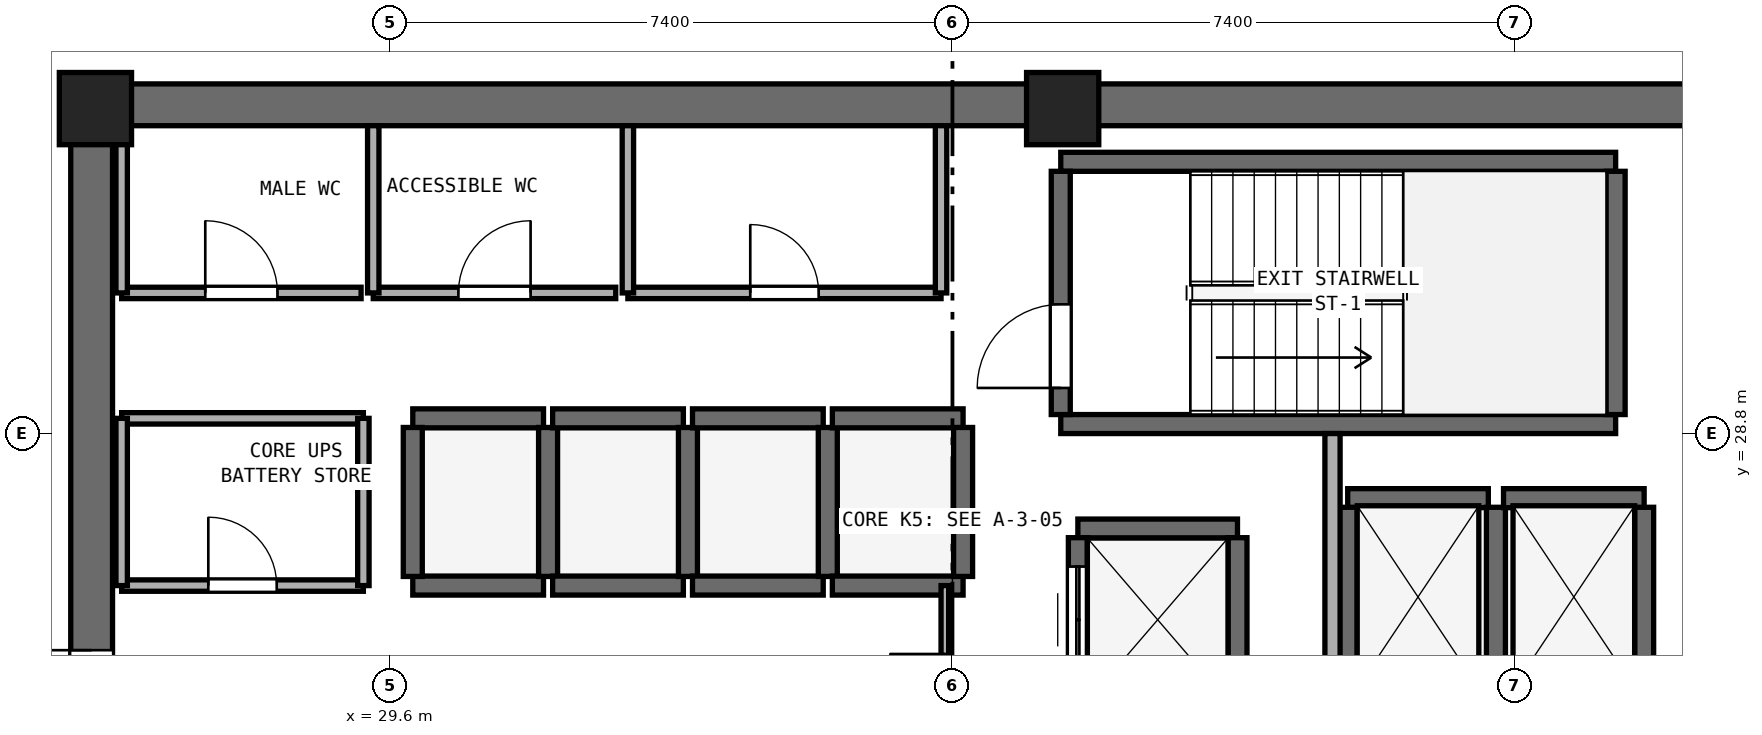
"""IFC4 building model, lengths in metres.
Left out: names, types, materials, properties, quantities, classifications, styles, units other than length and angle.
Written with IfcOpenShell. Run it as: python <this file> out.ifc"""

import sys

from ifc_helpers import new_model, si_unit, direction, frame, frame_2d, origin, origin_2d, place, context, subcontext, project, spatial, rectangle, extrude, element, fill, save


model = new_model("IFC4")
c1 = context("Model", 3, precision=1e-05, world=origin(), true_north=direction((0.0, 1.0)))
c2 = subcontext(c1, "Body", "Model", "MODEL_VIEW")
j1 = project(units=[si_unit("LENGTHUNIT", "METRE"), si_unit("PLANEANGLEUNIT", "RADIAN")], contexts=[c1])
p1 = place(None, origin())
s1 = spatial("IfcSite", under=j1, at=p1, CompositionType="ELEMENT")
p2 = place(p1, origin())
s2 = spatial("IfcBuilding", under=s1, at=p2, CompositionType="ELEMENT")
p3 = place(p2, frame((0.0, 0.0, 147.8)))
s3 = spatial("IfcBuildingStorey", under=s2, at=p3, CompositionType="ELEMENT", Elevation=147.8)
p4 = place(p3, frame((25.4, 33.125, 0.0), z_axis=(0.0, 0.0, 1.0), x_axis=(1.0, 0.0, 0.0)))
e1 = element("IfcWall", 1, at=p4, inside=s3, PredefinedType="SHEAR", context=c2, shape_type="SweptSolid", body=[
    extrude(rectangle(XDim=23.2, YDim=0.55, at=frame_2d((11.6, 0.0))), origin(), (0.0, 0.0, 1.0), 3.54),
])
p5 = place(p3, frame((25.675, 17.55, 0.0), z_axis=(0.0, 0.0, 1.0), x_axis=(0.0, 1.0, 0.0)))
e2 = element("IfcWall", 2, at=p5, inside=s3, PredefinedType="SHEAR", context=c2, shape_type="SweptSolid", body=[
    extrude(rectangle(XDim=15.3, YDim=0.55, at=frame_2d((7.65, 0.0))), origin(), (0.0, 0.0, 1.0), 3.54),
])
p6 = place(p5, frame((6.9, 0.0, 0.0)))
e3 = element("IfcOpeningElement", 3, at=p6, cuts=e2, PredefinedType="OPENING", context=c2, shape_type="SweptSolid", body=[
    extrude(rectangle(XDim=1.5, YDim=2.15, at=frame_2d((0.75, 1.075))), frame((0.0, 0.285, 0.0), z_axis=(0.0, -1.0, 0.0), x_axis=(1.0, 0.0, 0.0)), (0.0, 0.0, 1.0), 0.57),
])
for number, where, z_axis, x_axis in (
    (4, (38.45, 33.075, 0.0), (0.0, 0.0, 1.0), (1.0, 0.0, 0.0)),
    (5, (25.725, 33.075, 0.0), (0.0, 0.0, 1.0), (1.0, 0.0, 0.0)),
):
    element("IfcColumn", number, at=place(p3, frame(where, z_axis=z_axis, x_axis=x_axis)), inside=s3, PredefinedType="PILASTER", context=c2, shape_type="SweptSolid", body=[
        extrude(rectangle(XDim=0.95, YDim=0.95, at=origin_2d()), origin(), (0.0, 0.0, 1.0), 3.8),
    ])
for number, where, z_axis, x_axis in (
    (6, (38.425, 28.925, 0.0), (0.0, 0.0, 1.0), (1.0, 0.0, 0.0)),
    (7, (38.425, 32.375, 0.0), (0.0, 0.0, 1.0), (1.0, 0.0, 0.0)),
):
    element("IfcWall", number, at=place(p3, frame(where, z_axis=z_axis, x_axis=x_axis)), inside=s3, PredefinedType="SHEAR", context=c2, shape_type="SweptSolid", body=[
        extrude(rectangle(XDim=7.3, YDim=0.25, at=frame_2d((3.65, 0.0))), origin(), (0.0, 0.0, 1.0), 3.54),
    ])
p7 = place(p3, frame((38.425, 29.05, 0.0), z_axis=(0.0, 0.0, 1.0), x_axis=(0.0, 1.0, 0.0)))
e8 = element("IfcWall", 8, at=p7, inside=s3, PredefinedType="SHEAR", context=c2, shape_type="SweptSolid", body=[
    extrude(rectangle(XDim=3.2, YDim=0.25, at=frame_2d((1.6, 0.0))), origin(), (0.0, 0.0, 1.0), 3.54),
])
p8 = place(p7, frame((0.35, 0.0, 0.0)))
e9 = element("IfcOpeningElement", 9, at=p8, cuts=e8, PredefinedType="OPENING", context=c2, shape_type="SweptSolid", body=[
    extrude(rectangle(XDim=1.1, YDim=2.15, at=frame_2d((0.55, 1.075))), frame((0.0, 0.135, 0.0), z_axis=(0.0, -1.0, 0.0), x_axis=(1.0, 0.0, 0.0)), (0.0, 0.0, 1.0), 0.27),
])
p9 = place(p3, frame((45.725, 29.05, 0.0), z_axis=(0.0, 0.0, 1.0), x_axis=(0.0, 1.0, 0.0)))
e10 = element("IfcWall", 10, at=p9, inside=s3, PredefinedType="SHEAR", context=c2, shape_type="SweptSolid", body=[
    extrude(rectangle(XDim=3.2, YDim=0.25, at=frame_2d((1.6, 0.0))), origin(), (0.0, 0.0, 1.0), 3.54),
])
for number, where, z_axis, x_axis in (
    (11, (29.9, 26.8, 0.0), (0.0, 0.0, 1.0), (1.0, 0.0, 0.0)),
    (12, (29.9, 29.0, 0.0), (0.0, 0.0, 1.0), (1.0, 0.0, 0.0)),
):
    element("IfcWall", number, at=place(p3, frame(where, z_axis=z_axis, x_axis=x_axis)), inside=s3, PredefinedType="SHEAR", context=c2, shape_type="SweptSolid", body=[
        extrude(rectangle(XDim=1.72, YDim=0.25, at=frame_2d((0.86, 0.0))), origin(), (0.0, 0.0, 1.0), 3.54),
    ])
for number, where, z_axis, x_axis in (
    (13, (29.9, 26.92, 0.0), (0.0, 0.0, 1.0), (0.0, 1.0, 0.0)),
    (14, (31.68, 26.92, 0.0), (0.0, 0.0, 1.0), (0.0, 1.0, 0.0)),
):
    element("IfcWall", number, at=place(p3, frame(where, z_axis=z_axis, x_axis=x_axis)), inside=s3, PredefinedType="SHEAR", context=c2, shape_type="SweptSolid", body=[
        extrude(rectangle(XDim=1.96, YDim=0.25, at=frame_2d((0.98, 0.0))), origin(), (0.0, 0.0, 1.0), 3.54),
    ])
for number, where, z_axis, x_axis in (
    (15, (31.74, 26.8, 0.0), (0.0, 0.0, 1.0), (1.0, 0.0, 0.0)),
    (16, (31.74, 29.0, 0.0), (0.0, 0.0, 1.0), (1.0, 0.0, 0.0)),
):
    element("IfcWall", number, at=place(p3, frame(where, z_axis=z_axis, x_axis=x_axis)), inside=s3, PredefinedType="SHEAR", context=c2, shape_type="SweptSolid", body=[
        extrude(rectangle(XDim=1.72, YDim=0.25, at=frame_2d((0.86, 0.0))), origin(), (0.0, 0.0, 1.0), 3.54),
    ])
p10 = place(p3, frame((33.52, 26.92, 0.0), z_axis=(0.0, 0.0, 1.0), x_axis=(0.0, 1.0, 0.0)))
e17 = element("IfcWall", 17, at=p10, inside=s3, PredefinedType="SHEAR", context=c2, shape_type="SweptSolid", body=[
    extrude(rectangle(XDim=1.96, YDim=0.25, at=frame_2d((0.98, 0.0))), origin(), (0.0, 0.0, 1.0), 3.54),
])
for number, where, z_axis, x_axis in (
    (18, (33.58, 26.8, 0.0), (0.0, 0.0, 1.0), (1.0, 0.0, 0.0)),
    (19, (33.58, 29.0, 0.0), (0.0, 0.0, 1.0), (1.0, 0.0, 0.0)),
):
    element("IfcWall", number, at=place(p3, frame(where, z_axis=z_axis, x_axis=x_axis)), inside=s3, PredefinedType="SHEAR", context=c2, shape_type="SweptSolid", body=[
        extrude(rectangle(XDim=1.72, YDim=0.25, at=frame_2d((0.86, 0.0))), origin(), (0.0, 0.0, 1.0), 3.54),
    ])
p11 = place(p3, frame((35.36, 26.92, 0.0), z_axis=(0.0, 0.0, 1.0), x_axis=(0.0, 1.0, 0.0)))
e20 = element("IfcWall", 20, at=p11, inside=s3, PredefinedType="SHEAR", context=c2, shape_type="SweptSolid", body=[
    extrude(rectangle(XDim=1.96, YDim=0.25, at=frame_2d((0.98, 0.0))), origin(), (0.0, 0.0, 1.0), 3.54),
])
for number, where, z_axis, x_axis in (
    (21, (35.42, 26.8, 0.0), (0.0, 0.0, 1.0), (1.0, 0.0, 0.0)),
    (22, (35.42, 29.0, 0.0), (0.0, 0.0, 1.0), (1.0, 0.0, 0.0)),
):
    element("IfcWall", number, at=place(p3, frame(where, z_axis=z_axis, x_axis=x_axis)), inside=s3, PredefinedType="SHEAR", context=c2, shape_type="SweptSolid", body=[
        extrude(rectangle(XDim=1.72, YDim=0.25, at=frame_2d((0.86, 0.0))), origin(), (0.0, 0.0, 1.0), 3.54),
    ])
p12 = place(p3, frame((37.14, 26.92, 0.0), z_axis=(0.0, 0.0, 1.0), x_axis=(0.0, 1.0, 0.0)))
e23 = element("IfcWall", 23, at=p12, inside=s3, PredefinedType="SHEAR", context=c2, shape_type="SweptSolid", body=[
    extrude(rectangle(XDim=1.96, YDim=0.25, at=frame_2d((0.98, 0.0))), origin(), (0.0, 0.0, 1.0), 3.54),
])
p13 = place(p3, frame((42.2, 27.95, 0.0), z_axis=(0.0, 0.0, 1.0), x_axis=(1.0, 0.0, 0.0)))
e24 = element("IfcWall", 24, at=p13, inside=s3, PredefinedType="SHEAR", context=c2, shape_type="SweptSolid", body=[
    extrude(rectangle(XDim=1.85, YDim=0.25, at=frame_2d((0.925, 0.0))), origin(), (0.0, 0.0, 1.0), 3.54),
])
for number, where, z_axis, x_axis in (
    (25, (42.2, 25.47, 0.0), (0.0, 0.0, 1.0), (0.0, 1.0, 0.0)),
    (26, (44.15, 25.47, 0.0), (0.0, 0.0, 1.0), (0.0, 1.0, 0.0)),
):
    element("IfcWall", number, at=place(p3, frame(where, z_axis=z_axis, x_axis=x_axis)), inside=s3, PredefinedType="SHEAR", context=c2, shape_type="SweptSolid", body=[
        extrude(rectangle(XDim=2.36, YDim=0.25, at=frame_2d((1.18, 0.0))), origin(), (0.0, 0.0, 1.0), 3.54),
    ])
p14 = place(p3, frame((44.25, 27.95, 0.0), z_axis=(0.0, 0.0, 1.0), x_axis=(1.0, 0.0, 0.0)))
e27 = element("IfcWall", 27, at=p14, inside=s3, PredefinedType="SHEAR", context=c2, shape_type="SweptSolid", body=[
    extrude(rectangle(XDim=1.85, YDim=0.25, at=frame_2d((0.925, 0.0))), origin(), (0.0, 0.0, 1.0), 3.54),
])
p15 = place(p3, frame((46.1, 25.47, 0.0), z_axis=(0.0, 0.0, 1.0), x_axis=(0.0, 1.0, 0.0)))
e28 = element("IfcWall", 28, at=p15, inside=s3, PredefinedType="SHEAR", context=c2, shape_type="SweptSolid", body=[
    extrude(rectangle(XDim=2.36, YDim=0.25, at=frame_2d((1.18, 0.0))), origin(), (0.0, 0.0, 1.0), 3.54),
])
p16 = place(p3, frame((38.65, 27.55, 0.0), z_axis=(0.0, 0.0, 1.0), x_axis=(1.0, 0.0, 0.0)))
e29 = element("IfcWall", 29, at=p16, inside=s3, PredefinedType="SHEAR", context=c2, shape_type="SweptSolid", body=[
    extrude(rectangle(XDim=2.1, YDim=0.25, at=frame_2d((1.05, 0.0))), origin(), (0.0, 0.0, 1.0), 3.54),
])
p17 = place(p3, frame((38.65, 25.27, 0.0), z_axis=(0.0, 0.0, 1.0), x_axis=(0.0, 1.0, 0.0)))
e30 = element("IfcWall", 30, at=p17, inside=s3, PredefinedType="SHEAR", context=c2, shape_type="SweptSolid", body=[
    extrude(rectangle(XDim=2.16, YDim=0.25, at=frame_2d((1.08, 0.0))), origin(), (0.0, 0.0, 1.0), 3.54),
])
p18 = place(p17, frame((0.38, 0.0, 0.0)))
e31 = element("IfcOpeningElement", 31, at=p18, cuts=e30, PredefinedType="OPENING", context=c2, shape_type="SweptSolid", body=[
    extrude(rectangle(XDim=1.4, YDim=2.2, at=frame_2d((0.7, 1.1))), frame((0.0, 0.135, 0.0), z_axis=(0.0, -1.0, 0.0), x_axis=(1.0, 0.0, 0.0)), (0.0, 0.0, 1.0), 0.27),
])
p19 = place(p3, frame((40.75, 25.27, 0.0), z_axis=(0.0, 0.0, 1.0), x_axis=(0.0, 1.0, 0.0)))
e32 = element("IfcWall", 32, at=p19, inside=s3, PredefinedType="SHEAR", context=c2, shape_type="SweptSolid", body=[
    extrude(rectangle(XDim=2.16, YDim=0.25, at=frame_2d((1.08, 0.0))), origin(), (0.0, 0.0, 1.0), 3.54),
])
p20 = place(p3, frame((42.0, 22.75, 0.0), z_axis=(0.0, 0.0, 1.0), x_axis=(0.0, 1.0, 0.0)))
e33 = element("IfcWall", 33, at=p20, inside=s3, PredefinedType="SOLIDWALL", context=c2, shape_type="SweptSolid", body=[
    extrude(rectangle(XDim=6.05, YDim=0.2, at=frame_2d((3.025, 0.0))), origin(), (0.0, 0.0, 1.0), 3.54),
])
p21 = place(p20, frame((0.65, 0.0, 0.0)))
e34 = element("IfcOpeningElement", 34, at=p21, cuts=e33, PredefinedType="OPENING", context=c2, shape_type="SweptSolid", body=[
    extrude(rectangle(XDim=1.2, YDim=2.15, at=frame_2d((0.6, 1.075))), frame((0.0, 0.11, 0.0), z_axis=(0.0, -1.0, 0.0), x_axis=(1.0, 0.0, 0.0)), (0.0, 0.0, 1.0), 0.22),
])
p22 = place(p3, frame((26.07, 30.65, 0.0), z_axis=(0.0, 0.0, 1.0), x_axis=(1.0, 0.0, 0.0)))
e35 = element("IfcWall", 35, at=p22, inside=s3, PredefinedType="PARTITIONING", context=c2, shape_type="SweptSolid", body=[
    extrude(rectangle(XDim=3.15, YDim=0.15, at=frame_2d((1.575, 0.0))), origin(), (0.0, 0.0, 1.0), 3.54),
])
p23 = place(p22, frame((1.1, 0.0, 0.0)))
e36 = element("IfcOpeningElement", 36, at=p23, cuts=e35, PredefinedType="OPENING", context=c2, shape_type="SweptSolid", body=[
    extrude(rectangle(XDim=0.95, YDim=2.1, at=frame_2d((0.475, 1.05))), frame((0.0, 0.085, 0.0), z_axis=(0.0, -1.0, 0.0), x_axis=(1.0, 0.0, 0.0)), (0.0, 0.0, 1.0), 0.17),
])
p24 = place(p3, frame((26.07, 30.65, 0.0), z_axis=(0.0, 0.0, 1.0), x_axis=(0.0, 1.0, 0.0)))
e37 = element("IfcWall", 37, at=p24, inside=s3, PredefinedType="PARTITIONING", context=c2, shape_type="SweptSolid", body=[
    extrude(rectangle(XDim=2.2, YDim=0.15, at=frame_2d((1.1, 0.0))), origin(), (0.0, 0.0, 1.0), 2.64),
])
p25 = place(p3, frame((29.38, 30.65, 0.0), z_axis=(0.0, 0.0, 1.0), x_axis=(1.0, 0.0, 0.0)))
e38 = element("IfcWall", 38, at=p25, inside=s3, PredefinedType="PARTITIONING", context=c2, shape_type="SweptSolid", body=[
    extrude(rectangle(XDim=3.19, YDim=0.15, at=frame_2d((1.595, 0.0))), origin(), (0.0, 0.0, 1.0), 3.54),
])
p26 = place(p25, frame((1.12, 0.0, 0.0)))
e39 = element("IfcOpeningElement", 39, at=p26, cuts=e38, PredefinedType="OPENING", context=c2, shape_type="SweptSolid", body=[
    extrude(rectangle(XDim=0.95, YDim=2.1, at=frame_2d((0.475, 1.05))), frame((0.0, 0.085, 0.0), z_axis=(0.0, -1.0, 0.0), x_axis=(1.0, 0.0, 0.0)), (0.0, 0.0, 1.0), 0.17),
])
p27 = place(p3, frame((29.38, 30.65, 0.0), z_axis=(0.0, 0.0, 1.0), x_axis=(0.0, 1.0, 0.0)))
e40 = element("IfcWall", 40, at=p27, inside=s3, PredefinedType="PARTITIONING", context=c2, shape_type="SweptSolid", body=[
    extrude(rectangle(XDim=2.2, YDim=0.15, at=frame_2d((1.1, 0.0))), origin(), (0.0, 0.0, 1.0), 3.54),
])
p28 = place(p3, frame((32.73, 30.65, 0.0), z_axis=(0.0, 0.0, 1.0), x_axis=(1.0, 0.0, 0.0)))
e41 = element("IfcWall", 41, at=p28, inside=s3, PredefinedType="PARTITIONING", context=c2, shape_type="SweptSolid", body=[
    extrude(rectangle(XDim=4.12, YDim=0.15, at=frame_2d((2.06, 0.0))), origin(), (0.0, 0.0, 1.0), 3.54),
])
p29 = place(p28, frame((1.61, 0.0, 0.0)))
e42 = element("IfcOpeningElement", 42, at=p29, cuts=e41, PredefinedType="OPENING", context=c2, shape_type="SweptSolid", body=[
    extrude(rectangle(XDim=0.9, YDim=2.1, at=frame_2d((0.45, 1.05))), frame((0.0, 0.085, 0.0), z_axis=(0.0, -1.0, 0.0), x_axis=(1.0, 0.0, 0.0)), (0.0, 0.0, 1.0), 0.17),
])
for number, where, z_axis, x_axis in (
    (43, (32.73, 30.65, 0.0), (0.0, 0.0, 1.0), (0.0, 1.0, 0.0)),
    (44, (36.85, 30.65, 0.0), (0.0, 0.0, 1.0), (0.0, 1.0, 0.0)),
):
    element("IfcWall", number, at=place(p3, frame(where, z_axis=z_axis, x_axis=x_axis)), inside=s3, PredefinedType="PARTITIONING", context=c2, shape_type="SweptSolid", body=[
        extrude(rectangle(XDim=2.2, YDim=0.15, at=frame_2d((1.1, 0.0))), origin(), (0.0, 0.0, 1.0), 3.54),
    ])
p30 = place(p3, frame((26.07, 26.8, 0.0), z_axis=(0.0, 0.0, 1.0), x_axis=(1.0, 0.0, 0.0)))
e45 = element("IfcWall", 45, at=p30, inside=s3, PredefinedType="PARTITIONING", context=c2, shape_type="SweptSolid", body=[
    extrude(rectangle(XDim=3.18, YDim=0.15, at=frame_2d((1.59, 0.0))), origin(), (0.0, 0.0, 1.0), 3.54),
])
p31 = place(p30, frame((1.14, 0.0, 0.0)))
e46 = element("IfcOpeningElement", 46, at=p31, cuts=e45, PredefinedType="OPENING", context=c2, shape_type="SweptSolid", body=[
    extrude(rectangle(XDim=0.9, YDim=2.1, at=frame_2d((0.45, 1.05))), frame((0.0, 0.085, 0.0), z_axis=(0.0, -1.0, 0.0), x_axis=(1.0, 0.0, 0.0)), (0.0, 0.0, 1.0), 0.17),
])
p32 = place(p3, frame((26.07, 29.0, 0.0), z_axis=(0.0, 0.0, 1.0), x_axis=(1.0, 0.0, 0.0)))
e47 = element("IfcWall", 47, at=p32, inside=s3, PredefinedType="PARTITIONING", context=c2, shape_type="SweptSolid", body=[
    extrude(rectangle(XDim=3.18, YDim=0.15, at=frame_2d((1.59, 0.0))), origin(), (0.0, 0.0, 1.0), 3.54),
])
p33 = place(p3, frame((26.07, 26.8, 0.0), z_axis=(0.0, 0.0, 1.0), x_axis=(0.0, 1.0, 0.0)))
e48 = element("IfcWall", 48, at=p33, inside=s3, PredefinedType="PARTITIONING", context=c2, shape_type="SweptSolid", body=[
    extrude(rectangle(XDim=2.2, YDim=0.15, at=frame_2d((1.1, 0.0))), origin(), (0.0, 0.0, 1.0), 2.64),
])
p34 = place(p3, frame((29.25, 26.8, 0.0), z_axis=(0.0, 0.0, 1.0), x_axis=(0.0, 1.0, 0.0)))
e49 = element("IfcWall", 49, at=p34, inside=s3, PredefinedType="PARTITIONING", context=c2, shape_type="SweptSolid", body=[
    extrude(rectangle(XDim=2.2, YDim=0.15, at=frame_2d((1.1, 0.0))), origin(), (0.0, 0.0, 1.0), 3.54),
])
p35 = place(p3, frame((36.9, 23.6, 0.0), z_axis=(0.0, 0.0, 1.0), x_axis=(0.0, 1.0, 0.0)))
e50 = element("IfcWall", 50, at=p35, inside=s3, PredefinedType="PARTITIONING", context=c2, shape_type="SweptSolid", body=[
    extrude(rectangle(XDim=3.2, YDim=0.1, at=frame_2d((1.6, 0.0))), origin(), (0.0, 0.0, 1.0), 3.54),
])
p36 = place(p35, frame((0.85, 0.0, 0.0)))
e51 = element("IfcOpeningElement", 51, at=p36, cuts=e50, PredefinedType="OPENING", context=c2, shape_type="SweptSolid", body=[
    extrude(rectangle(XDim=1.45, YDim=2.12, at=frame_2d((0.725, 1.06))), frame((0.0, 0.06, 0.0), z_axis=(0.0, -1.0, 0.0), x_axis=(1.0, 0.0, 0.0)), (0.0, 0.0, 1.0), 0.12),
])
p37 = place(p8, origin())
e52 = element("IfcDoor", 52, at=p37, inside=s3, OperationType="SINGLE_SWING_LEFT", PredefinedType="DOOR", context=c2, shape_type="SweptSolid", body=[
    extrude(rectangle(XDim=1.1, YDim=2.15, at=frame_2d((0.55, 1.075))), frame((0.0, 0.025, 0.0), z_axis=(0.0, -1.0, 0.0), x_axis=(1.0, 0.0, 0.0)), (0.0, 0.0, 1.0), 0.05),
])
fill(e9, e52)
p38 = place(p18, origin())
e53 = element("IfcDoor", 53, at=p38, inside=s3, OperationType="DOUBLE_DOOR_SLIDING", PredefinedType="DOOR", context=c2, shape_type="SweptSolid", body=[
    extrude(rectangle(XDim=1.4, YDim=2.2, at=frame_2d((0.7, 1.1))), frame((0.0, 0.025, 0.0), z_axis=(0.0, -1.0, 0.0), x_axis=(1.0, 0.0, 0.0)), (0.0, 0.0, 1.0), 0.05),
])
fill(e31, e53)
p39 = place(p6, origin())
e54 = element("IfcDoor", 54, at=p39, inside=s3, OperationType="DOUBLE_DOOR_SINGLE_SWING", PredefinedType="DOOR", context=c2, shape_type="SweptSolid", body=[
    extrude(rectangle(XDim=1.5, YDim=2.15, at=frame_2d((0.75, 1.075))), frame((0.0, 0.025, 0.0), z_axis=(0.0, -1.0, 0.0), x_axis=(1.0, 0.0, 0.0)), (0.0, 0.0, 1.0), 0.05),
])
fill(e3, e54)
p40 = place(p23, origin())
e55 = element("IfcDoor", 55, at=p40, inside=s3, OperationType="SINGLE_SWING_LEFT", PredefinedType="DOOR", context=c2, shape_type="SweptSolid", body=[
    extrude(rectangle(XDim=0.95, YDim=2.1, at=frame_2d((0.475, 1.05))), frame((0.0, 0.025, 0.0), z_axis=(0.0, -1.0, 0.0), x_axis=(1.0, 0.0, 0.0)), (0.0, 0.0, 1.0), 0.05),
])
fill(e36, e55)
p41 = place(p26, origin())
e56 = element("IfcDoor", 56, at=p41, inside=s3, OperationType="SINGLE_SWING_RIGHT", PredefinedType="DOOR", context=c2, shape_type="SweptSolid", body=[
    extrude(rectangle(XDim=0.95, YDim=2.1, at=frame_2d((0.475, 1.05))), frame((0.0, 0.025, 0.0), z_axis=(0.0, -1.0, 0.0), x_axis=(1.0, 0.0, 0.0)), (0.0, 0.0, 1.0), 0.05),
])
fill(e39, e56)
p42 = place(p29, origin())
e57 = element("IfcDoor", 57, at=p42, inside=s3, OperationType="SINGLE_SWING_LEFT", PredefinedType="DOOR", context=c2, shape_type="SweptSolid", body=[
    extrude(rectangle(XDim=0.9, YDim=2.1, at=frame_2d((0.45, 1.05))), frame((0.0, 0.025, 0.0), z_axis=(0.0, -1.0, 0.0), x_axis=(1.0, 0.0, 0.0)), (0.0, 0.0, 1.0), 0.05),
])
fill(e42, e57)
p43 = place(p31, origin())
e58 = element("IfcDoor", 58, at=p43, inside=s3, OperationType="SINGLE_SWING_LEFT", PredefinedType="DOOR", context=c2, shape_type="SweptSolid", body=[
    extrude(rectangle(XDim=0.9, YDim=2.1, at=frame_2d((0.45, 1.05))), frame((0.0, 0.025, 0.0), z_axis=(0.0, -1.0, 0.0), x_axis=(1.0, 0.0, 0.0)), (0.0, 0.0, 1.0), 0.05),
])
fill(e46, e58)
p44 = place(p36, origin())
e59 = element("IfcDoor", 59, at=p44, inside=s3, OperationType="DOUBLE_DOOR_SINGLE_SWING", PredefinedType="DOOR", context=c2, shape_type="SweptSolid", body=[
    extrude(rectangle(XDim=1.45, YDim=2.12, at=frame_2d((0.725, 1.06))), frame((0.0, 0.025, 0.0), z_axis=(0.0, -1.0, 0.0), x_axis=(1.0, 0.0, 0.0)), (0.0, 0.0, 1.0), 0.05),
])
fill(e51, e59)
save(model, sys.argv[1])
